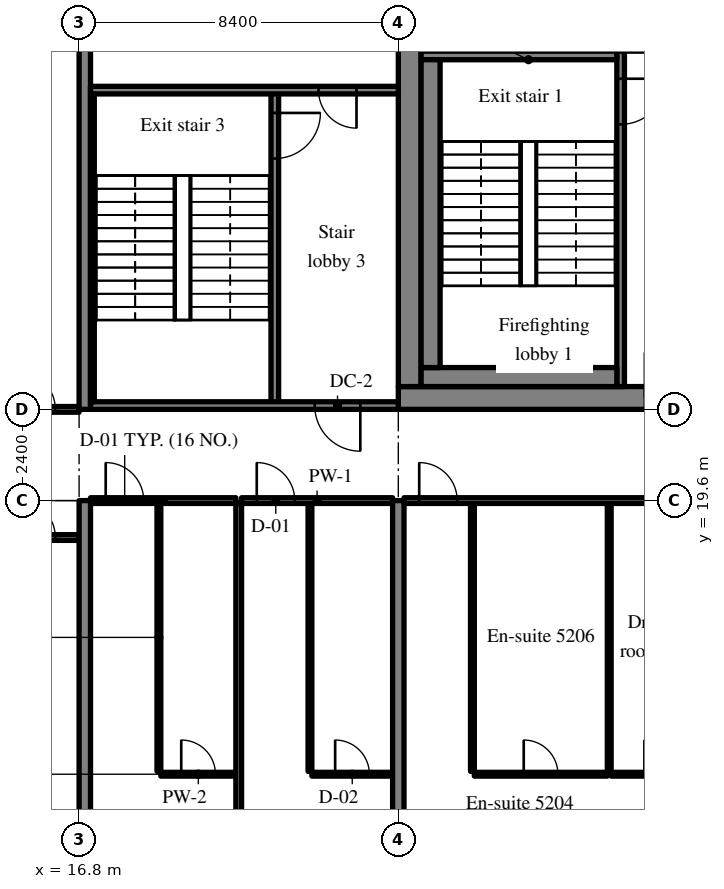
"""IFC4 building model, lengths in metres.
Left out: names, types, materials, properties, quantities, classifications, styles, units other than length and angle.
Written with IfcOpenShell. Run it as: python <this file> out.ifc"""

import sys

from ifc_helpers import new_model, si_unit, direction, frame, frame_2d, origin, place, context, subcontext, project, spatial, rectangle, extrude, source, transform, mapped, element, fill, save


model = new_model("IFC4")
c1 = context("Model", 3, precision=1e-05, world=origin(), true_north=direction((0.0, 1.0)))
c2 = subcontext(c1, "Body", "Model", "MODEL_VIEW")
j1 = project(units=[si_unit("LENGTHUNIT", "METRE"), si_unit("PLANEANGLEUNIT", "RADIAN")], contexts=[c1])
p1 = place(None, origin())
s1 = spatial("IfcSite", under=j1, at=p1, CompositionType="ELEMENT")
p2 = place(p1, origin())
s2 = spatial("IfcBuilding", under=s1, at=p2, CompositionType="ELEMENT")
p3 = place(p2, frame((0.0, 0.0, 217.9)))
s3 = spatial("IfcBuildingStorey", under=s2, at=p3, CompositionType="ELEMENT", Elevation=217.9)
m1 = source(origin(), c2, "Body", "SweptSolid", [
    extrude(rectangle(XDim=50.4, YDim=0.6, at=frame_2d((25.2, 0.0))), origin(), (0.0, 0.0, 1.0), 3.62),
])
p4 = place(p3, frame((25.2, 22.3, 0.0), z_axis=(0.0, 0.0, 1.0), x_axis=(1.0, 0.0, 0.0)))
e1 = element("IfcWall", 1, at=p4, inside=s3, PredefinedType="SHEAR", context=c2, shape_type="MappedRepresentation", body=[
    mapped(m1, transform((0.0, 0.0, 0.0), scale=1.0)),
])
m2 = source(origin(), c2, "Body", "SweptSolid", [
    extrude(rectangle(XDim=1.8, YDim=2.1, at=frame_2d((0.9, 1.05))), frame((0.0, 0.31, 0.0), z_axis=(0.0, -1.0, 0.0), x_axis=(1.0, 0.0, 0.0)), (0.0, 0.0, 1.0), 0.62),
])
p5 = place(p4, frame((15.9, 0.0, 0.0)))
e2 = element("IfcOpeningElement", 2, at=p5, cuts=e1, PredefinedType="OPENING", context=c2, shape_type="MappedRepresentation", body=[
    mapped(m2, transform((0.0, 0.0, 0.0), scale=1.0)),
])
m3 = source(origin(), c2, "Body", "SweptSolid", [
    extrude(rectangle(XDim=0.9, YDim=2.1, at=frame_2d((0.45, 1.05))), frame((0.0, 0.31, 0.0), z_axis=(0.0, -1.0, 0.0), x_axis=(1.0, 0.0, 0.0)), (0.0, 0.0, 1.0), 0.62),
])
p6 = place(p4, frame((9.687, 0.0, 0.0)))
e3 = element("IfcOpeningElement", 3, at=p6, cuts=e1, PredefinedType="OPENING", context=c2, shape_type="MappedRepresentation", body=[
    mapped(m3, transform((0.0, 0.0, 0.0), scale=1.0)),
])
p7 = place(p4, frame((21.513, 0.0, 0.0)))
e4 = element("IfcOpeningElement", 4, at=p7, cuts=e1, PredefinedType="OPENING", context=c2, shape_type="MappedRepresentation", body=[
    mapped(m3, transform((0.0, 0.0, 0.0), scale=1.0)),
])
p8 = place(p4, frame((32.7, 0.0, 0.0)))
e5 = element("IfcOpeningElement", 5, at=p8, cuts=e1, PredefinedType="OPENING", context=c2, shape_type="MappedRepresentation", body=[
    mapped(m2, transform((0.0, 0.0, 0.0), scale=1.0)),
])
m4 = source(origin(), c2, "Body", "SweptSolid", [
    extrude(rectangle(XDim=1.2, YDim=2.1, at=frame_2d((0.6, 1.05))), frame((0.0, 0.31, 0.0), z_axis=(0.0, -1.0, 0.0), x_axis=(1.0, 0.0, 0.0)), (0.0, 0.0, 1.0), 0.62),
])
p9 = place(p4, frame((6.488, 0.0, 0.0)))
e6 = element("IfcOpeningElement", 6, at=p9, cuts=e1, PredefinedType="OPENING", context=c2, shape_type="MappedRepresentation", body=[
    mapped(m4, transform((0.0, 0.0, 0.0), scale=1.0)),
])
p10 = place(p4, frame((47.925, 0.0, 0.0)))
e7 = element("IfcOpeningElement", 7, at=p10, cuts=e1, PredefinedType="OPENING", context=c2, shape_type="MappedRepresentation", body=[
    mapped(m4, transform((0.0, 0.0, 0.0), scale=1.0)),
])
m5 = source(origin(), c2, "Body", "SweptSolid", [
    extrude(rectangle(XDim=18.8, YDim=0.6, at=frame_2d((9.4, 0.0))), origin(), (0.0, 0.0, 1.0), 3.62),
])
p11 = place(p3, frame((25.5, 22.6, 0.0), z_axis=(0.0, 0.0, 1.0), x_axis=(0.0, 1.0, 0.0)))
e8 = element("IfcWall", 8, at=p11, inside=s3, PredefinedType="SHEAR", context=c2, shape_type="MappedRepresentation", body=[
    mapped(m5, transform((0.0, 0.0, 0.0), scale=1.0)),
])
m6 = source(origin(), c2, "Body", "SweptSolid", [
    extrude(rectangle(XDim=12.5, YDim=0.3, at=frame_2d((6.25, 0.0))), origin(), (0.0, 0.0, 1.0), 3.62),
])
p12 = place(p3, frame((16.95, 7.1, 0.0), z_axis=(0.0, 0.0, 1.0), x_axis=(0.0, 1.0, 0.0)))
e9 = element("IfcWall", 9, at=p12, inside=s3, PredefinedType="SHEAR", context=c2, shape_type="MappedRepresentation", body=[
    mapped(m6, transform((0.0, 0.0, 0.0), scale=1.0)),
])
m7 = source(origin(), c2, "Body", "SweptSolid", [
    extrude(rectangle(XDim=18.4, YDim=0.3, at=frame_2d((9.2, 0.0))), origin(), (0.0, 0.0, 1.0), 3.62),
])
p13 = place(p3, frame((16.95, 22.0, 0.0), z_axis=(0.0, 0.0, 1.0), x_axis=(0.0, 1.0, 0.0)))
e10 = element("IfcWall", 10, at=p13, inside=s3, PredefinedType="SHEAR", context=c2, shape_type="MappedRepresentation", body=[
    mapped(m7, transform((0.0, 0.0, 0.0), scale=1.0)),
])
m8 = source(origin(), c2, "Body", "SweptSolid", [
    extrude(rectangle(XDim=14.1, YDim=0.3, at=frame_2d((7.05, 0.0))), origin(), (0.0, 0.0, 1.0), 3.62),
])
p14 = place(p3, frame((25.2, 5.5, 0.0), z_axis=(0.0, 0.0, 1.0), x_axis=(0.0, 1.0, 0.0)))
e11 = element("IfcWall", 11, at=p14, inside=s3, PredefinedType="SHEAR", context=c2, shape_type="MappedRepresentation", body=[
    mapped(m8, transform((0.0, 0.0, 0.0), scale=1.0)),
])
m9 = source(origin(), c2, "Body", "SweptSolid", [
    extrude(rectangle(XDim=8.825, YDim=0.2, at=frame_2d((4.413, 0.0))), origin(), (0.0, 0.0, 1.0), 3.62),
])
p15 = place(p3, frame((31.05, 22.6, 0.0), z_axis=(0.0, 0.0, 1.0), x_axis=(0.0, 1.0, 0.0)))
e12 = element("IfcWall", 12, at=p15, inside=s3, PredefinedType="SOLIDWALL", context=c2, shape_type="MappedRepresentation", body=[
    mapped(m9, transform((0.0, 0.0, 0.0), scale=1.0)),
])
m10 = source(origin(), c2, "Body", "SweptSolid", [
    extrude(rectangle(XDim=1.2, YDim=2.1, at=frame_2d((0.6, 1.05))), frame((0.0, 0.11, 0.0), z_axis=(0.0, -1.0, 0.0), x_axis=(1.0, 0.0, 0.0)), (0.0, 0.0, 1.0), 0.22),
])
p16 = place(p15, frame((6.9, 0.0, 0.0)))
e13 = element("IfcOpeningElement", 13, at=p16, cuts=e12, PredefinedType="OPENING", context=c2, shape_type="MappedRepresentation", body=[
    mapped(m10, transform((0.0, 0.0, 0.0), scale=1.0)),
])
m11 = source(origin(), c2, "Body", "SweptSolid", [
    extrude(rectangle(XDim=8.3, YDim=0.2, at=frame_2d((4.15, 0.0))), origin(), (0.0, 0.0, 1.0), 3.62),
])
p17 = place(p3, frame((21.95, 22.1, 0.0), z_axis=(0.0, 0.0, 1.0), x_axis=(0.0, 1.0, 0.0)))
e14 = element("IfcWall", 14, at=p17, inside=s3, PredefinedType="SOLIDWALL", context=c2, shape_type="MappedRepresentation", body=[
    mapped(m11, transform((0.0, 0.0, 0.0), scale=1.0)),
])
p18 = place(p17, frame((6.5, 0.0, 0.0)))
e15 = element("IfcOpeningElement", 15, at=p18, cuts=e14, PredefinedType="OPENING", context=c2, shape_type="MappedRepresentation", body=[
    mapped(m10, transform((0.0, 0.0, 0.0), scale=1.0)),
])
m12 = source(origin(), c2, "Body", "SweptSolid", [
    extrude(rectangle(XDim=8.1, YDim=0.2, at=frame_2d((4.05, 0.0))), origin(), (0.0, 0.0, 1.0), 3.62),
])
p19 = place(p3, frame((17.1, 22.1, 0.0), z_axis=(0.0, 0.0, 1.0), x_axis=(1.0, 0.0, 0.0)))
e16 = element("IfcWall", 16, at=p19, inside=s3, PredefinedType="SOLIDWALL", context=c2, shape_type="MappedRepresentation", body=[
    mapped(m12, transform((0.0, 0.0, 0.0), scale=1.0)),
])
p20 = place(p19, frame((5.9, 0.0, 0.0)))
e17 = element("IfcOpeningElement", 17, at=p20, cuts=e16, PredefinedType="OPENING", context=c2, shape_type="MappedRepresentation", body=[
    mapped(m10, transform((0.0, 0.0, 0.0), scale=1.0)),
])
p21 = place(p3, frame((17.1, 30.4, 0.0), z_axis=(0.0, 0.0, 1.0), x_axis=(1.0, 0.0, 0.0)))
e18 = element("IfcWall", 18, at=p21, inside=s3, PredefinedType="SOLIDWALL", context=c2, shape_type="MappedRepresentation", body=[
    mapped(m12, transform((0.0, 0.0, 0.0), scale=1.0)),
])
m13 = source(origin(), c2, "Body", "SweptSolid", [
    extrude(rectangle(XDim=1.0, YDim=2.1, at=frame_2d((0.5, 1.05))), frame((0.0, 0.11, 0.0), z_axis=(0.0, -1.0, 0.0), x_axis=(1.0, 0.0, 0.0)), (0.0, 0.0, 1.0), 0.22),
])
p22 = place(p21, frame((6.0, 0.0, 0.0)))
e19 = element("IfcOpeningElement", 19, at=p22, cuts=e18, PredefinedType="OPENING", context=c2, shape_type="MappedRepresentation", body=[
    mapped(m13, transform((0.0, 0.0, 0.0), scale=1.0)),
])
m14 = source(origin(), c2, "Body", "SweptSolid", [
    extrude(rectangle(XDim=5.15, YDim=0.5, at=frame_2d((2.575, 0.0))), origin(), (0.0, 0.0, 1.0), 3.62),
])
p23 = place(p3, frame((25.8, 22.85, 0.0), z_axis=(0.0, 0.0, 1.0), x_axis=(1.0, 0.0, 0.0)))
e20 = element("IfcWall", 20, at=p23, inside=s3, PredefinedType="SOLIDWALL", context=c2, shape_type="MappedRepresentation", body=[
    mapped(m14, transform((0.0, 0.0, 0.0), scale=1.0)),
])
m15 = source(origin(), c2, "Body", "SweptSolid", [
    extrude(rectangle(XDim=5.15, YDim=0.225, at=frame_2d((2.575, 0.0))), origin(), (0.0, 0.0, 1.0), 3.62),
])
p24 = place(p3, frame((25.8, 31.312, 0.0), z_axis=(0.0, 0.0, 1.0), x_axis=(1.0, 0.0, 0.0)))
e21 = element("IfcWall", 21, at=p24, inside=s3, PredefinedType="SOLIDWALL", context=c2, shape_type="MappedRepresentation", body=[
    mapped(m15, transform((0.0, 0.0, 0.0), scale=1.0)),
])
m16 = source(origin(), c2, "Body", "SweptSolid", [
    extrude(rectangle(XDim=8.1, YDim=0.5, at=frame_2d((4.05, 0.0))), origin(), (0.0, 0.0, 1.0), 3.62),
])
p25 = place(p3, frame((26.05, 23.1, 0.0), z_axis=(0.0, 0.0, 1.0), x_axis=(0.0, 1.0, 0.0)))
e22 = element("IfcWall", 22, at=p25, inside=s3, PredefinedType="SOLIDWALL", context=c2, shape_type="MappedRepresentation", body=[
    mapped(m16, transform((0.0, 0.0, 0.0), scale=1.0)),
])
m17 = source(origin(), c2, "Body", "SweptSolid", [
    extrude(rectangle(XDim=8.1, YDim=0.1, at=frame_2d((4.05, 0.0))), origin(), (0.0, 0.0, 1.0), 3.62),
])
p26 = place(p3, frame((17.15, 22.2, 0.0), z_axis=(0.0, 0.0, 1.0), x_axis=(0.0, 1.0, 0.0)))
e23 = element("IfcWall", 23, at=p26, inside=s3, PredefinedType="SOLIDWALL", context=c2, shape_type="MappedRepresentation", body=[
    mapped(m17, transform((0.0, 0.0, 0.0), scale=1.0)),
])
m18 = source(origin(), c2, "Body", "SweptSolid", [
    extrude(rectangle(XDim=7.05, YDim=0.1, at=frame_2d((3.525, 0.0))), origin(), (0.0, 0.0, 1.0), 3.62),
])
p27 = place(p3, frame((18.9, 12.475, 0.0), z_axis=(0.0, 0.0, 1.0), x_axis=(0.0, 1.0, 0.0)))
e24 = element("IfcWall", 24, at=p27, inside=s3, PredefinedType="PARTITIONING", context=c2, shape_type="MappedRepresentation", body=[
    mapped(m18, transform((0.0, 0.0, 0.0), scale=1.0)),
])
m19 = source(origin(), c2, "Body", "SweptSolid", [
    extrude(rectangle(XDim=1.975, YDim=0.1, at=frame_2d((0.988, 0.0))), origin(), (0.0, 0.0, 1.0), 3.62),
])
p28 = place(p3, frame((18.95, 12.4, 0.0), z_axis=(0.0, 0.0, 1.0), x_axis=(1.0, 0.0, 0.0)))
e25 = element("IfcWall", 25, at=p28, inside=s3, PredefinedType="PARTITIONING", context=c2, shape_type="MappedRepresentation", body=[
    mapped(m19, transform((0.0, 0.0, 0.0), scale=1.0)),
])
m20 = source(origin(), c2, "Body", "SweptSolid", [
    extrude(rectangle(XDim=0.9, YDim=2.1, at=frame_2d((0.45, 1.05))), frame((0.0, 0.06, 0.0), z_axis=(0.0, -1.0, 0.0), x_axis=(1.0, 0.0, 0.0)), (0.0, 0.0, 1.0), 0.12),
])
p29 = place(p28, frame((0.538, 0.0, 0.0)))
e26 = element("IfcOpeningElement", 26, at=p29, cuts=e25, PredefinedType="OPENING", context=c2, shape_type="MappedRepresentation", body=[
    mapped(m20, transform((0.0, 0.0, 0.0), scale=1.0)),
])
m21 = source(origin(), c2, "Body", "SweptSolid", [
    extrude(rectangle(XDim=3.825, YDim=0.15, at=frame_2d((1.913, 0.0))), origin(), (0.0, 0.0, 1.0), 2.92),
])
p30 = place(p3, frame((17.1, 19.6, 0.0), z_axis=(0.0, 0.0, 1.0), x_axis=(1.0, 0.0, 0.0)))
e27 = element("IfcWall", 27, at=p30, inside=s3, PredefinedType="PARTITIONING", context=c2, shape_type="MappedRepresentation", body=[
    mapped(m21, transform((0.0, 0.0, 0.0), scale=1.0)),
])
m22 = source(origin(), c2, "Body", "SweptSolid", [
    extrude(rectangle(XDim=1.0, YDim=2.1, at=frame_2d((0.5, 1.05))), frame((0.0, 0.085, 0.0), z_axis=(0.0, -1.0, 0.0), x_axis=(1.0, 0.0, 0.0)), (0.0, 0.0, 1.0), 0.17),
])
p31 = place(p30, frame((0.4, 0.0, 0.0)))
e28 = element("IfcOpeningElement", 28, at=p31, cuts=e27, PredefinedType="OPENING", context=c2, shape_type="MappedRepresentation", body=[
    mapped(m22, transform((0.0, 0.0, 0.0), scale=1.0)),
])
p32 = place(p3, frame((22.875, 12.475, 0.0), z_axis=(0.0, 0.0, 1.0), x_axis=(0.0, 1.0, 0.0)))
e29 = element("IfcWall", 29, at=p32, inside=s3, PredefinedType="PARTITIONING", context=c2, shape_type="MappedRepresentation", body=[
    mapped(m18, transform((0.0, 0.0, 0.0), scale=1.0)),
])
m23 = source(origin(), c2, "Body", "SweptSolid", [
    extrude(rectangle(XDim=2.125, YDim=0.1, at=frame_2d((1.062, 0.0))), origin(), (0.0, 0.0, 1.0), 3.62),
])
p33 = place(p3, frame((22.925, 12.4, 0.0), z_axis=(0.0, 0.0, 1.0), x_axis=(1.0, 0.0, 0.0)))
e30 = element("IfcWall", 30, at=p33, inside=s3, PredefinedType="PARTITIONING", context=c2, shape_type="MappedRepresentation", body=[
    mapped(m23, transform((0.0, 0.0, 0.0), scale=1.0)),
])
p34 = place(p33, frame((0.613, 0.0, 0.0)))
e31 = element("IfcOpeningElement", 31, at=p34, cuts=e30, PredefinedType="OPENING", context=c2, shape_type="MappedRepresentation", body=[
    mapped(m20, transform((0.0, 0.0, 0.0), scale=1.0)),
])
m24 = source(origin(), c2, "Body", "SweptSolid", [
    extrude(rectangle(XDim=3.975, YDim=0.15, at=frame_2d((1.988, 0.0))), origin(), (0.0, 0.0, 1.0), 2.92),
])
p35 = place(p3, frame((21.075, 19.6, 0.0), z_axis=(0.0, 0.0, 1.0), x_axis=(1.0, 0.0, 0.0)))
e32 = element("IfcWall", 32, at=p35, inside=s3, PredefinedType="PARTITIONING", context=c2, shape_type="MappedRepresentation", body=[
    mapped(m24, transform((0.0, 0.0, 0.0), scale=1.0)),
])
p36 = place(p35, frame((0.4, 0.0, 0.0)))
e33 = element("IfcOpeningElement", 33, at=p36, cuts=e32, PredefinedType="OPENING", context=c2, shape_type="MappedRepresentation", body=[
    mapped(m22, transform((0.0, 0.0, 0.0), scale=1.0)),
])
m25 = source(origin(), c2, "Body", "SweptSolid", [
    extrude(rectangle(XDim=12.275, YDim=0.15, at=frame_2d((6.137, 0.0))), origin(), (0.0, 0.0, 1.0), 3.62),
])
p37 = place(p3, frame((21.0, 7.25, 0.0), z_axis=(0.0, 0.0, 1.0), x_axis=(0.0, 1.0, 0.0)))
e34 = element("IfcWall", 34, at=p37, inside=s3, PredefinedType="PARTITIONING", context=c2, shape_type="MappedRepresentation", body=[
    mapped(m25, transform((0.0, 0.0, 0.0), scale=1.0)),
])
for number, where, z_axis, x_axis in (
    (35, (27.15, 12.475, 0.0), (0.0, 0.0, 1.0), (0.0, 1.0, 0.0)),
    (36, (30.75, 12.475, 0.0), (0.0, 0.0, 1.0), (0.0, 1.0, 0.0)),
):
    element("IfcWall", number, at=place(p3, frame(where, z_axis=z_axis, x_axis=x_axis)), inside=s3, PredefinedType="PARTITIONING", context=c2, shape_type="MappedRepresentation", body=[
        mapped(m18, transform((0.0, 0.0, 0.0), scale=1.0)),
    ])
m26 = source(origin(), c2, "Body", "SweptSolid", [
    extrude(rectangle(XDim=3.5, YDim=0.1, at=frame_2d((1.75, 0.0))), origin(), (0.0, 0.0, 1.0), 3.62),
])
p38 = place(p3, frame((27.2, 12.4, 0.0), z_axis=(0.0, 0.0, 1.0), x_axis=(1.0, 0.0, 0.0)))
e37 = element("IfcWall", 37, at=p38, inside=s3, PredefinedType="PARTITIONING", context=c2, shape_type="MappedRepresentation", body=[
    mapped(m26, transform((0.0, 0.0, 0.0), scale=1.0)),
])
p39 = place(p38, frame((1.3, 0.0, 0.0)))
e38 = element("IfcOpeningElement", 38, at=p39, cuts=e37, PredefinedType="OPENING", context=c2, shape_type="MappedRepresentation", body=[
    mapped(m20, transform((0.0, 0.0, 0.0), scale=1.0)),
])
m27 = source(origin(), c2, "Body", "SweptSolid", [
    extrude(rectangle(XDim=2.65, YDim=0.1, at=frame_2d((1.325, 0.0))), origin(), (0.0, 0.0, 1.0), 3.62),
])
p40 = place(p3, frame((30.8, 12.4, 0.0), z_axis=(0.0, 0.0, 1.0), x_axis=(1.0, 0.0, 0.0)))
e39 = element("IfcWall", 39, at=p40, inside=s3, PredefinedType="PARTITIONING", context=c2, shape_type="MappedRepresentation", body=[
    mapped(m27, transform((0.0, 0.0, 0.0), scale=1.0)),
])
p41 = place(p40, frame((0.875, 0.0, 0.0)))
e40 = element("IfcOpeningElement", 40, at=p41, cuts=e39, PredefinedType="OPENING", context=c2, shape_type="MappedRepresentation", body=[
    mapped(m20, transform((0.0, 0.0, 0.0), scale=1.0)),
])
m28 = source(origin(), c2, "Body", "SweptSolid", [
    extrude(rectangle(XDim=8.1, YDim=0.15, at=frame_2d((4.05, 0.0))), origin(), (0.0, 0.0, 1.0), 2.92),
])
p42 = place(p3, frame((25.35, 19.6, 0.0), z_axis=(0.0, 0.0, 1.0), x_axis=(1.0, 0.0, 0.0)))
e41 = element("IfcWall", 41, at=p42, inside=s3, PredefinedType="PARTITIONING", context=c2, shape_type="MappedRepresentation", body=[
    mapped(m28, transform((0.0, 0.0, 0.0), scale=1.0)),
])
p43 = place(p42, frame((0.4, 0.0, 0.0)))
e42 = element("IfcOpeningElement", 42, at=p43, cuts=e41, PredefinedType="OPENING", context=c2, shape_type="MappedRepresentation", body=[
    mapped(m22, transform((0.0, 0.0, 0.0), scale=1.0)),
])
m29 = source(origin(), c2, "Body", "SweptSolid", [
    extrude(rectangle(XDim=1.9, YDim=0.15, at=frame_2d((0.95, 0.0))), origin(), (0.0, 0.0, 1.0), 2.92),
])
p44 = place(p3, frame((14.9, 22.0, 0.0), z_axis=(0.0, 0.0, 1.0), x_axis=(1.0, 0.0, 0.0)))
e43 = element("IfcWall", 43, at=p44, inside=s3, PredefinedType="PARTITIONING", context=c2, shape_type="MappedRepresentation", body=[
    mapped(m29, transform((0.0, 0.0, 0.0), scale=1.0)),
])
p45 = place(p44, frame((0.275, 0.0, 0.0)))
e44 = element("IfcOpeningElement", 44, at=p45, cuts=e43, PredefinedType="OPENING", context=c2, shape_type="MappedRepresentation", body=[
    mapped(m22, transform((0.0, 0.0, 0.0), scale=1.0)),
])
p46 = place(p3, frame((14.9, 18.628, 0.0), z_axis=(0.0, 0.0, 1.0), x_axis=(1.0, 0.0, 0.0)))
e45 = element("IfcWall", 45, at=p46, inside=s3, PredefinedType="PARTITIONING", context=c2, shape_type="MappedRepresentation", body=[
    mapped(m29, transform((0.0, 0.0, 0.0), scale=1.0)),
])
p47 = place(p46, frame((0.275, 0.0, 0.0)))
e46 = element("IfcOpeningElement", 46, at=p47, cuts=e45, PredefinedType="OPENING", context=c2, shape_type="MappedRepresentation", body=[
    mapped(m22, transform((0.0, 0.0, 0.0), scale=1.0)),
])
m30 = source(origin(), c2, "Body", "SweptSolid", [
    extrude(rectangle(XDim=1.2, YDim=2.1, at=frame_2d((0.6, 1.05))), frame((0.0, 0.025, 0.0), z_axis=(0.0, -1.0, 0.0), x_axis=(1.0, 0.0, 0.0)), (0.0, 0.0, 1.0), 0.05),
])
p48 = place(p16, origin())
e47 = element("IfcDoor", 47, at=p48, inside=s3, OperationType="SINGLE_SWING_RIGHT", PredefinedType="DOOR", context=c2, shape_type="MappedRepresentation", body=[
    mapped(m30, transform((0.0, 0.0, 0.0), scale=1.0)),
])
fill(e13, e47)
p49 = place(p18, origin())
e48 = element("IfcDoor", 48, at=p49, inside=s3, OperationType="SINGLE_SWING_RIGHT", PredefinedType="DOOR", context=c2, shape_type="MappedRepresentation", body=[
    mapped(m30, transform((0.0, 0.0, 0.0), scale=1.0)),
])
fill(e15, e48)
p50 = place(p20, origin())
e49 = element("IfcDoor", 49, at=p50, inside=s3, OperationType="SINGLE_SWING_RIGHT", PredefinedType="DOOR", context=c2, shape_type="MappedRepresentation", body=[
    mapped(m30, transform((0.0, 0.0, 0.0), scale=1.0)),
])
fill(e17, e49)
m31 = source(origin(), c2, "Body", "SweptSolid", [
    extrude(rectangle(XDim=1.0, YDim=2.1, at=frame_2d((0.5, 1.05))), frame((0.0, 0.025, 0.0), z_axis=(0.0, -1.0, 0.0), x_axis=(1.0, 0.0, 0.0)), (0.0, 0.0, 1.0), 0.05),
])
p51 = place(p22, origin())
e50 = element("IfcDoor", 50, at=p51, inside=s3, OperationType="SINGLE_SWING_RIGHT", PredefinedType="DOOR", context=c2, shape_type="MappedRepresentation", body=[
    mapped(m31, transform((0.0, 0.0, 0.0), scale=1.0)),
])
fill(e19, e50)
m32 = source(origin(), c2, "Body", "SweptSolid", [
    extrude(rectangle(XDim=0.9, YDim=2.1, at=frame_2d((0.45, 1.05))), frame((0.0, 0.025, 0.0), z_axis=(0.0, -1.0, 0.0), x_axis=(1.0, 0.0, 0.0)), (0.0, 0.0, 1.0), 0.05),
])
p52 = place(p29, origin())
e51 = element("IfcDoor", 51, at=p52, inside=s3, OperationType="SINGLE_SWING_LEFT", PredefinedType="DOOR", context=c2, shape_type="MappedRepresentation", body=[
    mapped(m32, transform((0.0, 0.0, 0.0), scale=1.0)),
])
fill(e26, e51)
p53 = place(p31, origin())
e52 = element("IfcDoor", 52, at=p53, inside=s3, OperationType="SINGLE_SWING_LEFT", PredefinedType="DOOR", context=c2, shape_type="MappedRepresentation", body=[
    mapped(m31, transform((0.0, 0.0, 0.0), scale=1.0)),
])
fill(e28, e52)
p54 = place(p34, origin())
e53 = element("IfcDoor", 53, at=p54, inside=s3, OperationType="SINGLE_SWING_LEFT", PredefinedType="DOOR", context=c2, shape_type="MappedRepresentation", body=[
    mapped(m32, transform((0.0, 0.0, 0.0), scale=1.0)),
])
fill(e31, e53)
p55 = place(p36, origin())
e54 = element("IfcDoor", 54, at=p55, inside=s3, OperationType="SINGLE_SWING_LEFT", PredefinedType="DOOR", context=c2, shape_type="MappedRepresentation", body=[
    mapped(m31, transform((0.0, 0.0, 0.0), scale=1.0)),
])
fill(e33, e54)
p56 = place(p39, origin())
e55 = element("IfcDoor", 55, at=p56, inside=s3, OperationType="SINGLE_SWING_LEFT", PredefinedType="DOOR", context=c2, shape_type="MappedRepresentation", body=[
    mapped(m32, transform((0.0, 0.0, 0.0), scale=1.0)),
])
fill(e38, e55)
p57 = place(p43, origin())
e56 = element("IfcDoor", 56, at=p57, inside=s3, OperationType="SINGLE_SWING_LEFT", PredefinedType="DOOR", context=c2, shape_type="MappedRepresentation", body=[
    mapped(m31, transform((0.0, 0.0, 0.0), scale=1.0)),
])
fill(e42, e56)
p58 = place(p45, origin())
e57 = element("IfcDoor", 57, at=p58, inside=s3, OperationType="SINGLE_SWING_LEFT", PredefinedType="DOOR", context=c2, shape_type="MappedRepresentation", body=[
    mapped(m31, transform((0.0, 0.0, 0.0), scale=1.0)),
])
fill(e44, e57)
p59 = place(p47, origin())
e58 = element("IfcDoor", 58, at=p59, inside=s3, OperationType="SINGLE_SWING_LEFT", PredefinedType="DOOR", context=c2, shape_type="MappedRepresentation", body=[
    mapped(m31, transform((0.0, 0.0, 0.0), scale=1.0)),
])
fill(e46, e58)
save(model, sys.argv[1])
